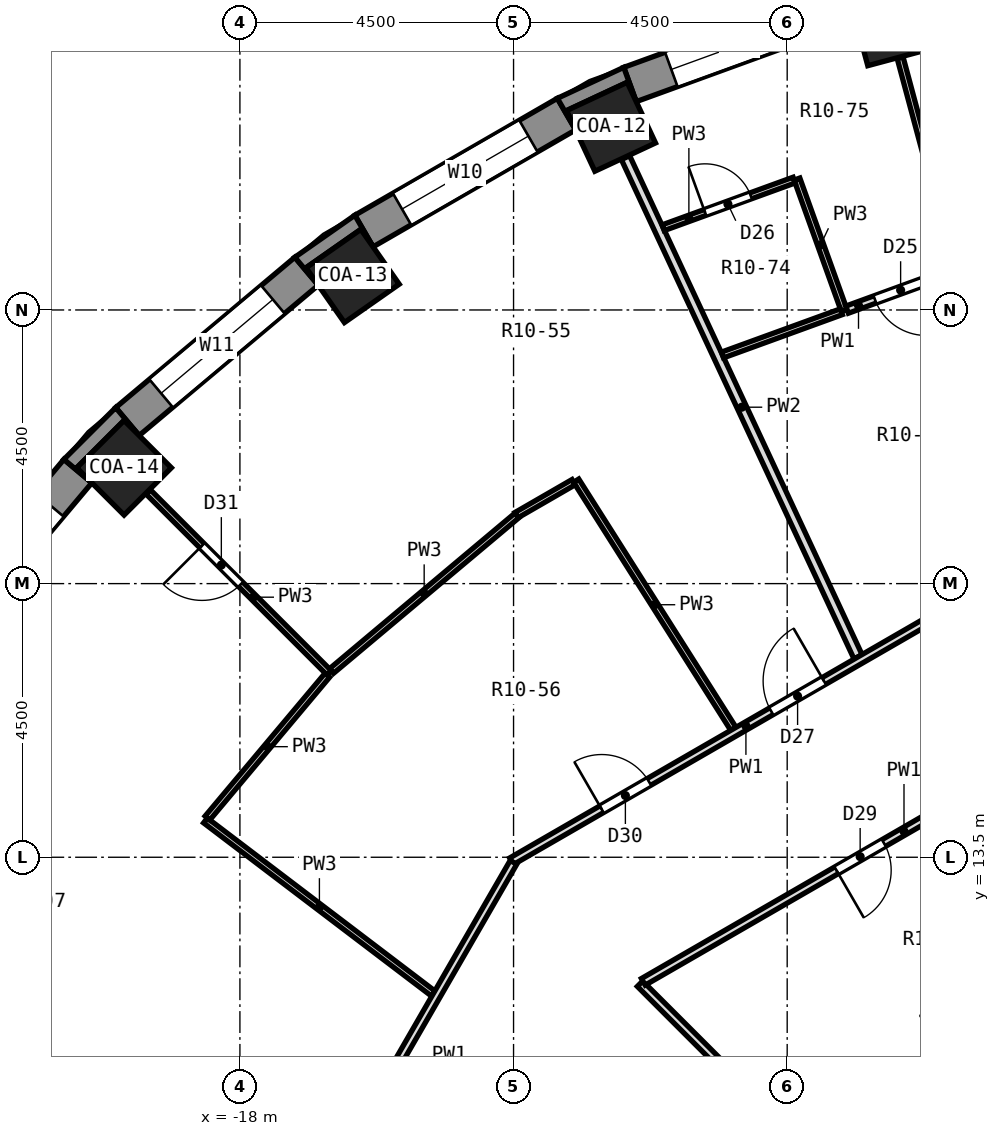
"""IFC4 building model, lengths in metres.
Left out: names, types, materials, properties, quantities, classifications, styles, units other than length and angle.
Written with IfcOpenShell. Run it as: python <this file> out.ifc"""

import sys

from ifc_helpers import new_model, si_unit, direction, frame, frame_2d, origin, origin_2d, place, context, subcontext, project, spatial, polyline, rectangle, outline, extrude, element, fill, save


model = new_model("IFC4")
c1 = context("Model", 3, precision=1e-05, world=origin(), true_north=direction((0.0, 1.0)))
c2 = subcontext(c1, "Body", "Model", "MODEL_VIEW")
j1 = project(units=[si_unit("LENGTHUNIT", "METRE"), si_unit("PLANEANGLEUNIT", "RADIAN")], contexts=[c1])
p1 = place(None, origin())
s1 = spatial("IfcSite", under=j1, at=p1, CompositionType="ELEMENT")
p2 = place(p1, origin())
s2 = spatial("IfcBuilding", under=s1, at=p2, CompositionType="ELEMENT")
p3 = place(p2, frame((0.0, 0.0, 36.2)))
s3 = spatial("IfcBuildingStorey", under=s2, at=p3, CompositionType="ELEMENT", Elevation=36.2)
for number, where, z_axis, x_axis in (
    (1, (-7.286, 27.191, 0.0), (0.0, 0.0, 1.0), (-0.259, 0.966, 0.0)),
    (2, (-11.897, 25.512, 0.0), (0.0, 0.0, 1.0), (-0.423, 0.906, 0.0)),
    (3, (-16.146, 23.059, 0.0), (0.0, 0.0, 1.0), (-0.574, 0.819, 0.0)),
    (4, (-19.905, 19.905, 0.0), (0.0, 0.0, 1.0), (-0.707, 0.707, 0.0)),
):
    element("IfcColumn", number, at=place(p3, frame(where, z_axis=z_axis, x_axis=x_axis)), inside=s3, PredefinedType="COLUMN", context=c2, shape_type="SweptSolid", body=[
        extrude(rectangle(XDim=1.1, YDim=1.1, at=origin_2d()), origin(), (0.0, 0.0, 1.0), 3.3),
    ])
p4 = place(p3, frame((-7.971, 27.523, 0.0), z_axis=(0.0, 0.0, 1.0), x_axis=(-0.939689588564, -0.342028474173, 0.0)))
e5 = element("IfcWall", 5, at=p4, inside=s3, PredefinedType="SOLIDWALL", context=c2, shape_type="SweptSolid", body=[
    extrude(rectangle(XDim=3.846, YDim=0.6, at=frame_2d((1.923, 0.0))), origin(), (0.0, 0.0, 1.0), 2.75),
])
p5 = place(p4, frame((0.723, 0.0, 0.9)))
e6 = element("IfcOpeningElement", 6, at=p5, cuts=e5, PredefinedType="OPENING", context=c2, shape_type="SweptSolid", body=[
    extrude(rectangle(XDim=2.4, YDim=1.8, at=frame_2d((1.2, 0.9))), frame((0.0, 0.312, 0.0), z_axis=(0.0, -1.0, 0.0), x_axis=(1.0, 0.0, 0.0)), (0.0, 0.0, 1.0), 0.624),
])
p6 = place(p3, frame((-12.63, 25.721, 0.0), z_axis=(0.0, 0.0, 1.0), x_axis=(-0.86603124159, -0.499989888488, 0.0)))
e7 = element("IfcWall", 7, at=p6, inside=s3, PredefinedType="SOLIDWALL", context=c2, shape_type="SweptSolid", body=[
    extrude(rectangle(XDim=3.846, YDim=0.6, at=frame_2d((1.923, 0.0))), origin(), (0.0, 0.0, 1.0), 2.75),
])
p7 = place(p6, frame((0.723, 0.0, 0.9)))
e8 = element("IfcOpeningElement", 8, at=p7, cuts=e7, PredefinedType="OPENING", context=c2, shape_type="SweptSolid", body=[
    extrude(rectangle(XDim=2.4, YDim=1.8, at=frame_2d((1.2, 0.9))), frame((0.0, 0.312, 0.0), z_axis=(0.0, -1.0, 0.0), x_axis=(1.0, 0.0, 0.0)), (0.0, 0.0, 1.0), 0.624),
])
p8 = place(p3, frame((-16.904, 23.137, 0.0), z_axis=(0.0, 0.0, 1.0), x_axis=(-0.766026164483, -0.642809392687, 0.0)))
e9 = element("IfcWall", 9, at=p8, inside=s3, PredefinedType="SOLIDWALL", context=c2, shape_type="SweptSolid", body=[
    extrude(rectangle(XDim=3.846, YDim=0.6, at=frame_2d((1.923, 0.0))), origin(), (0.0, 0.0, 1.0), 2.75),
])
p9 = place(p8, frame((0.723, 0.0, 0.9)))
e10 = element("IfcOpeningElement", 10, at=p9, cuts=e9, PredefinedType="OPENING", context=c2, shape_type="SweptSolid", body=[
    extrude(rectangle(XDim=2.4, YDim=1.8, at=frame_2d((1.2, 0.9))), frame((0.0, 0.312, 0.0), z_axis=(0.0, -1.0, 0.0), x_axis=(1.0, 0.0, 0.0)), (0.0, 0.0, 1.0), 0.624),
])
p10 = place(p3, frame((-20.665, 19.85, 0.0), z_axis=(0.0, 0.0, 1.0), x_axis=(-0.642809392687, -0.766026164483, 0.0)))
e11 = element("IfcWall", 11, at=p10, inside=s3, PredefinedType="SOLIDWALL", context=c2, shape_type="SweptSolid", body=[
    extrude(rectangle(XDim=3.846, YDim=0.6, at=frame_2d((1.923, 0.0))), origin(), (0.0, 0.0, 1.0), 2.75),
])
p11 = place(p10, frame((0.723, 0.0, 0.9)))
e12 = element("IfcOpeningElement", 12, at=p11, cuts=e11, PredefinedType="OPENING", context=c2, shape_type="SweptSolid", body=[
    extrude(rectangle(XDim=2.4, YDim=1.8, at=frame_2d((1.2, 0.9))), frame((0.0, 0.312, 0.0), z_axis=(0.0, -1.0, 0.0), x_axis=(1.0, 0.0, 0.0)), (0.0, 0.0, 1.0), 0.624),
])
p12 = place(p3, origin())
e13 = element("IfcWall", 13, at=p12, inside=s3, PredefinedType="SOLIDWALL", context=c2, shape_type="SweptSolid", body=[
    extrude(outline(polyline([(-12.78, 25.981), (-12.479, 25.461), (-12.628, 25.779), (-11.631, 26.243), (-11.483, 25.926), (-11.688, 26.49), (-12.78, 25.981)])), origin(), (0.0, 0.0, 1.0), 2.75),
])
p13 = place(p3, origin())
e14 = element("IfcWall", 14, at=p13, inside=s3, PredefinedType="SOLIDWALL", context=c2, shape_type="SweptSolid", body=[
    extrude(outline(polyline([(-16.11, 24.058), (-17.097, 23.367), (-16.711, 22.907), (-16.912, 23.194), (-16.011, 23.825), (-15.81, 23.538), (-16.11, 24.058)])), origin(), (0.0, 0.0, 1.0), 2.75),
])
p14 = place(p3, origin())
e15 = element("IfcWall", 15, at=p14, inside=s3, PredefinedType="SOLIDWALL", context=c2, shape_type="SweptSolid", body=[
    extrude(outline(polyline([(-20.895, 20.043), (-20.435, 19.657), (-20.683, 19.905), (-19.905, 20.683), (-19.657, 20.435), (-20.043, 20.895), (-20.895, 20.043)])), origin(), (0.0, 0.0, 1.0), 2.75),
])
p15 = place(p3, frame((-7.143, 26.649, 0.0), z_axis=(0.0, 0.0, 1.0), x_axis=(0.259371754041, -0.965777558864, 0.0)))
e16 = element("IfcWall", 16, at=p15, inside=s3, PredefinedType="PARTITIONING", context=c2, shape_type="SweptSolid", body=[
    extrude(rectangle(XDim=3.609, YDim=0.1, at=frame_2d((1.804, 0.0))), origin(), (0.0, 0.0, 1.0), 2.75),
])
p16 = place(p3, frame((-8.839, 24.653, 0.0), z_axis=(0.0, 0.0, 1.0), x_axis=(0.337828591949, -0.941207651085, 0.0)))
e17 = element("IfcWall", 17, at=p16, inside=s3, PredefinedType="PARTITIONING", context=c2, shape_type="SweptSolid", body=[
    extrude(rectangle(XDim=2.3, YDim=0.1, at=frame_2d((1.15, 0.0))), origin(), (0.0, 0.0, 1.0), 2.75),
])
p17 = place(p3, frame((-11.659, 25.006, 0.0), z_axis=(0.0, 0.0, 1.0), x_axis=(0.422264101424, -0.906472850475, 0.0)))
e18 = element("IfcWall", 18, at=p17, inside=s3, PredefinedType="PARTITIONING", context=c2, shape_type="SweptSolid", body=[
    extrude(rectangle(XDim=9.057, YDim=0.15, at=frame_2d((4.529, 0.0))), origin(), (0.0, 0.0, 1.0), 2.75),
])
p18 = place(p3, frame((-12.47, 19.693, 0.0), z_axis=(0.0, 0.0, 1.0), x_axis=(0.535000379435, -0.844851817779, 0.0)))
e19 = element("IfcWall", 19, at=p18, inside=s3, PredefinedType="PARTITIONING", context=c2, shape_type="SweptSolid", body=[
    extrude(rectangle(XDim=4.831, YDim=0.1, at=frame_2d((2.416, 0.0))), origin(), (0.0, 0.0, 1.0), 2.75),
])
p19 = place(p3, frame((-19.509, 19.509, 0.0), z_axis=(0.0, 0.0, 1.0), x_axis=(0.707106781187, -0.707106781187, 0.0)))
e20 = element("IfcWall", 20, at=p19, inside=s3, PredefinedType="PARTITIONING", context=c2, shape_type="SweptSolid", body=[
    extrude(rectangle(XDim=4.212, YDim=0.1, at=frame_2d((2.106, 0.0))), origin(), (0.0, 0.0, 1.0), 2.75),
])
p20 = place(p19, frame((1.252, 0.0, 0.0)))
e21 = element("IfcOpeningElement", 21, at=p20, cuts=e20, PredefinedType="OPENING", context=c2, shape_type="SweptSolid", body=[
    extrude(rectangle(XDim=0.9, YDim=2.1, at=frame_2d((0.45, 1.05))), frame((0.0, 0.062, 0.0), z_axis=(0.0, -1.0, 0.0), x_axis=(1.0, 0.0, 0.0)), (0.0, 0.0, 1.0), 0.124),
])
p21 = place(p3, frame((-11.42, 11.42, 0.0), z_axis=(0.0, 0.0, 1.0), x_axis=(0.707106781187, -0.707106781187, 0.0)))
e22 = element("IfcWall", 22, at=p21, inside=s3, PredefinedType="PARTITIONING", context=c2, shape_type="SweptSolid", body=[
    extrude(rectangle(XDim=6.558, YDim=0.125, at=frame_2d((3.279, 0.0))), origin(), (0.0, 0.0, 1.0), 2.75),
])
p22 = place(p3, frame((-18.567, 14.105, 0.0), z_axis=(0.0, 0.0, 1.0), x_axis=(0.796206168274, -0.605025402444, 0.0)))
e23 = element("IfcWall", 23, at=p22, inside=s3, PredefinedType="PARTITIONING", context=c2, shape_type="SweptSolid", body=[
    extrude(rectangle(XDim=4.707, YDim=0.1, at=frame_2d((2.354, 0.0))), origin(), (0.0, 0.0, 1.0), 2.75),
])
p23 = place(p3, frame((-10.064, 21.76, 0.0), z_axis=(0.0, 0.0, 1.0), x_axis=(0.939769439446, 0.341809012, 0.0)))
e24 = element("IfcWall", 24, at=p23, inside=s3, PredefinedType="PARTITIONING", context=c2, shape_type="SweptSolid", body=[
    extrude(rectangle(XDim=2.081, YDim=0.1, at=frame_2d((1.04, 0.0))), origin(), (0.0, 0.0, 1.0), 2.75),
])
p24 = place(p3, frame((-8.015, 22.505, 0.0), z_axis=(0.0, 0.0, 1.0), x_axis=(0.939553626447, 0.342401785962, 0.0)))
e25 = element("IfcWall", 25, at=p24, inside=s3, PredefinedType="PARTITIONING", context=c2, shape_type="SweptSolid", body=[
    extrude(rectangle(XDim=1.875, YDim=0.125, at=frame_2d((0.937, 0.0))), origin(), (0.0, 0.0, 1.0), 2.75),
])
p25 = place(p24, frame((0.487, 0.0, 0.0)))
e26 = element("IfcOpeningElement", 26, at=p25, cuts=e25, PredefinedType="OPENING", context=c2, shape_type="SweptSolid", body=[
    extrude(rectangle(XDim=0.9, YDim=2.1, at=frame_2d((0.45, 1.05))), frame((0.0, 0.074, 0.0), z_axis=(0.0, -1.0, 0.0), x_axis=(1.0, 0.0, 0.0)), (0.0, 0.0, 1.0), 0.149),
])
p26 = place(p3, frame((-11.04, 23.853, 0.0), z_axis=(0.0, 0.0, 1.0), x_axis=(0.93974675699, 0.341871368686, 0.0)))
e27 = element("IfcWall", 27, at=p26, inside=s3, PredefinedType="PARTITIONING", context=c2, shape_type="SweptSolid", body=[
    extrude(rectangle(XDim=2.292, YDim=0.1, at=frame_2d((1.146, 0.0))), origin(), (0.0, 0.0, 1.0), 2.75),
])
p27 = place(p26, frame((0.733, 0.0, 0.0)))
e28 = element("IfcOpeningElement", 28, at=p27, cuts=e27, PredefinedType="OPENING", context=c2, shape_type="SweptSolid", body=[
    extrude(rectangle(XDim=0.8, YDim=2.1, at=frame_2d((0.4, 1.05))), frame((0.0, 0.062, 0.0), z_axis=(0.0, -1.0, 0.0), x_axis=(1.0, 0.0, 0.0)), (0.0, 0.0, 1.0), 0.124),
])
p28 = place(p3, frame((-8.694, 8.779, 0.0), z_axis=(0.0, 0.0, 1.0), x_axis=(0.86602790099, 0.499995674689, 0.0)))
e29 = element("IfcWall", 29, at=p28, inside=s3, PredefinedType="PARTITIONING", context=c2, shape_type="SweptSolid", body=[
    extrude(rectangle(XDim=6.291, YDim=0.1, at=frame_2d((3.146, 0.0))), origin(), (0.0, 0.0, 1.0), 2.75),
])
p29 = place(p28, frame((2.689, 0.0, 0.0)))
e30 = element("IfcOpeningElement", 30, at=p29, cuts=e29, PredefinedType="OPENING", context=c2, shape_type="SweptSolid", body=[
    extrude(rectangle(XDim=0.9, YDim=2.1, at=frame_2d((0.45, 1.05))), frame((0.0, 0.062, 0.0), z_axis=(0.0, -1.0, 0.0), x_axis=(1.0, 0.0, 0.0)), (0.0, 0.0, 1.0), 0.124),
])
p30 = place(p3, frame((-11.366, 11.451, 0.0), z_axis=(0.0, 0.0, 1.0), x_axis=(0.866019704869, 0.500009870681, 0.0)))
e31 = element("IfcWall", 31, at=p30, inside=s3, PredefinedType="PARTITIONING", context=c2, shape_type="SweptSolid", body=[
    extrude(rectangle(XDim=8.235, YDim=0.125, at=frame_2d((4.118, 0.0))), origin(), (0.0, 0.0, 1.0), 2.75),
])
p31 = place(p30, frame((3.667, 0.0, 0.0)))
e32 = element("IfcOpeningElement", 32, at=p31, cuts=e31, PredefinedType="OPENING", context=c2, shape_type="SweptSolid", body=[
    extrude(rectangle(XDim=0.9, YDim=2.1, at=frame_2d((0.45, 1.05))), frame((0.0, 0.074, 0.0), z_axis=(0.0, -1.0, 0.0), x_axis=(1.0, 0.0, 0.0)), (0.0, 0.0, 1.0), 0.149),
])
p32 = place(p3, frame((-13.532, 13.434, 0.0), z_axis=(0.0, 0.0, 1.0), x_axis=(0.86605048973, 0.49995654735, 0.0)))
e33 = element("IfcWall", 33, at=p32, inside=s3, PredefinedType="PARTITIONING", context=c2, shape_type="SweptSolid", body=[
    extrude(rectangle(XDim=9.871, YDim=0.125, at=frame_2d((4.935, 0.0))), origin(), (0.0, 0.0, 1.0), 2.75),
])
p33 = place(p32, frame((4.931, 0.0, 0.0)))
e34 = element("IfcOpeningElement", 34, at=p33, cuts=e33, PredefinedType="OPENING", context=c2, shape_type="SweptSolid", body=[
    extrude(rectangle(XDim=1.0, YDim=2.1, at=frame_2d((0.5, 1.05))), frame((0.0, 0.074, 0.0), z_axis=(0.0, -1.0, 0.0), x_axis=(1.0, 0.0, 0.0)), (0.0, 0.0, 1.0), 0.149),
])
p34 = place(p32, frame((1.711, 0.0, 0.0)))
e35 = element("IfcOpeningElement", 35, at=p34, cuts=e33, PredefinedType="OPENING", context=c2, shape_type="SweptSolid", body=[
    extrude(rectangle(XDim=0.9, YDim=2.1, at=frame_2d((0.45, 1.05))), frame((0.0, 0.074, 0.0), z_axis=(0.0, -1.0, 0.0), x_axis=(1.0, 0.0, 0.0)), (0.0, 0.0, 1.0), 0.149),
])
p35 = place(p3, frame((-13.453, 19.126, 0.0), z_axis=(0.0, 0.0, 1.0), x_axis=(0.866144373206, 0.499793882279, 0.0)))
e36 = element("IfcWall", 36, at=p35, inside=s3, PredefinedType="PARTITIONING", context=c2, shape_type="SweptSolid", body=[
    extrude(rectangle(XDim=1.085, YDim=0.1, at=frame_2d((0.542, 0.0))), origin(), (0.0, 0.0, 1.0), 2.75),
])
p36 = place(p3, frame((-16.493, 16.563, 0.0), z_axis=(0.0, 0.0, 1.0), x_axis=(0.766012051309, 0.642826210767, 0.0)))
e37 = element("IfcWall", 37, at=p36, inside=s3, PredefinedType="PARTITIONING", context=c2, shape_type="SweptSolid", body=[
    extrude(rectangle(XDim=3.976, YDim=0.1, at=frame_2d((1.988, 0.0))), origin(), (0.0, 0.0, 1.0), 2.75),
])
p37 = place(p3, frame((-18.533, 14.145, 0.0), z_axis=(0.0, 0.0, 1.0), x_axis=(0.642844541506, 0.765996668045, 0.0)))
e38 = element("IfcWall", 38, at=p37, inside=s3, PredefinedType="PARTITIONING", context=c2, shape_type="SweptSolid", body=[
    extrude(rectangle(XDim=3.065, YDim=0.1, at=frame_2d((1.532, 0.0))), origin(), (0.0, 0.0, 1.0), 2.75),
])
p38 = place(p3, frame((-15.422, 10.089, 0.0), z_axis=(0.0, 0.0, 1.0), x_axis=(0.499953532967, 0.866052229876, 0.0)))
e39 = element("IfcWall", 39, at=p38, inside=s3, PredefinedType="PARTITIONING", context=c2, shape_type="SweptSolid", body=[
    extrude(rectangle(XDim=3.841, YDim=0.125, at=frame_2d((1.92, 0.0))), origin(), (0.0, 0.0, 1.0), 2.75),
])
p39 = place(p5, origin())
e40 = element("IfcWindow", 40, at=p39, inside=s3, PartitioningType="SINGLE_PANEL", PredefinedType="WINDOW", context=c2, shape_type="SweptSolid", body=[
    extrude(rectangle(XDim=2.4, YDim=1.8, at=frame_2d((1.2, 0.9))), frame((0.0, 0.18, 0.0), z_axis=(0.0, -1.0, 0.0), x_axis=(1.0, 0.0, 0.0)), (0.0, 0.0, 1.0), 0.06),
])
fill(e6, e40)
p40 = place(p7, origin())
e41 = element("IfcWindow", 41, at=p40, inside=s3, PartitioningType="SINGLE_PANEL", PredefinedType="WINDOW", context=c2, shape_type="SweptSolid", body=[
    extrude(rectangle(XDim=2.4, YDim=1.8, at=frame_2d((1.2, 0.9))), frame((0.0, 0.18, 0.0), z_axis=(0.0, -1.0, 0.0), x_axis=(1.0, 0.0, 0.0)), (0.0, 0.0, 1.0), 0.06),
])
fill(e8, e41)
p41 = place(p9, origin())
e42 = element("IfcWindow", 42, at=p41, inside=s3, PartitioningType="SINGLE_PANEL", PredefinedType="WINDOW", context=c2, shape_type="SweptSolid", body=[
    extrude(rectangle(XDim=2.4, YDim=1.8, at=frame_2d((1.2, 0.9))), frame((0.0, 0.18, 0.0), z_axis=(0.0, -1.0, 0.0), x_axis=(1.0, 0.0, 0.0)), (0.0, 0.0, 1.0), 0.06),
])
fill(e10, e42)
p42 = place(p11, origin())
e43 = element("IfcWindow", 43, at=p42, inside=s3, PartitioningType="SINGLE_PANEL", PredefinedType="WINDOW", context=c2, shape_type="SweptSolid", body=[
    extrude(rectangle(XDim=2.4, YDim=1.8, at=frame_2d((1.2, 0.9))), frame((0.0, 0.18, 0.0), z_axis=(0.0, -1.0, 0.0), x_axis=(1.0, 0.0, 0.0)), (0.0, 0.0, 1.0), 0.06),
])
fill(e12, e43)
p43 = place(p25, frame((0.9, 0.0, 0.0), z_axis=(0.0, 0.0, 1.0), x_axis=(-1.0, 0.0, 0.0)))
e44 = element("IfcDoor", 44, at=p43, inside=s3, OperationType="SINGLE_SWING_LEFT", PredefinedType="DOOR", context=c2, shape_type="SweptSolid", body=[
    extrude(rectangle(XDim=0.9, YDim=2.1, at=frame_2d((0.45, 1.05))), frame((0.0, 0.025, 0.0), z_axis=(0.0, -1.0, 0.0), x_axis=(1.0, 0.0, 0.0)), (0.0, 0.0, 1.0), 0.05),
])
fill(e26, e44)
p44 = place(p27, origin())
e45 = element("IfcDoor", 45, at=p44, inside=s3, OperationType="SINGLE_SWING_LEFT", PredefinedType="DOOR", context=c2, shape_type="SweptSolid", body=[
    extrude(rectangle(XDim=0.8, YDim=2.1, at=frame_2d((0.4, 1.05))), frame((0.0, 0.025, 0.0), z_axis=(0.0, -1.0, 0.0), x_axis=(1.0, 0.0, 0.0)), (0.0, 0.0, 1.0), 0.05),
])
fill(e28, e45)
p45 = place(p33, origin())
e46 = element("IfcDoor", 46, at=p45, inside=s3, OperationType="SINGLE_SWING_RIGHT", PredefinedType="DOOR", context=c2, shape_type="SweptSolid", body=[
    extrude(rectangle(XDim=1.0, YDim=2.1, at=frame_2d((0.5, 1.05))), frame((0.0, 0.025, 0.0), z_axis=(0.0, -1.0, 0.0), x_axis=(1.0, 0.0, 0.0)), (0.0, 0.0, 1.0), 0.05),
])
fill(e34, e46)
p46 = place(p31, frame((0.9, 0.0, 0.0), z_axis=(0.0, 0.0, 1.0), x_axis=(-1.0, 0.0, 0.0)))
e47 = element("IfcDoor", 47, at=p46, inside=s3, OperationType="SINGLE_SWING_RIGHT", PredefinedType="DOOR", context=c2, shape_type="SweptSolid", body=[
    extrude(rectangle(XDim=0.9, YDim=2.1, at=frame_2d((0.45, 1.05))), frame((0.0, 0.025, 0.0), z_axis=(0.0, -1.0, 0.0), x_axis=(1.0, 0.0, 0.0)), (0.0, 0.0, 1.0), 0.05),
])
fill(e32, e47)
p47 = place(p34, origin())
e48 = element("IfcDoor", 48, at=p47, inside=s3, OperationType="SINGLE_SWING_LEFT", PredefinedType="DOOR", context=c2, shape_type="SweptSolid", body=[
    extrude(rectangle(XDim=0.9, YDim=2.1, at=frame_2d((0.45, 1.05))), frame((0.0, 0.025, 0.0), z_axis=(0.0, -1.0, 0.0), x_axis=(1.0, 0.0, 0.0)), (0.0, 0.0, 1.0), 0.05),
])
fill(e35, e48)
p48 = place(p20, frame((0.9, 0.0, 0.0), z_axis=(0.0, 0.0, 1.0), x_axis=(-1.0, 0.0, 0.0)))
e49 = element("IfcDoor", 49, at=p48, inside=s3, OperationType="SINGLE_SWING_RIGHT", PredefinedType="DOOR", context=c2, shape_type="SweptSolid", body=[
    extrude(rectangle(XDim=0.9, YDim=2.1, at=frame_2d((0.45, 1.05))), frame((0.0, 0.025, 0.0), z_axis=(0.0, -1.0, 0.0), x_axis=(1.0, 0.0, 0.0)), (0.0, 0.0, 1.0), 0.05),
])
fill(e21, e49)
save(model, sys.argv[1])
